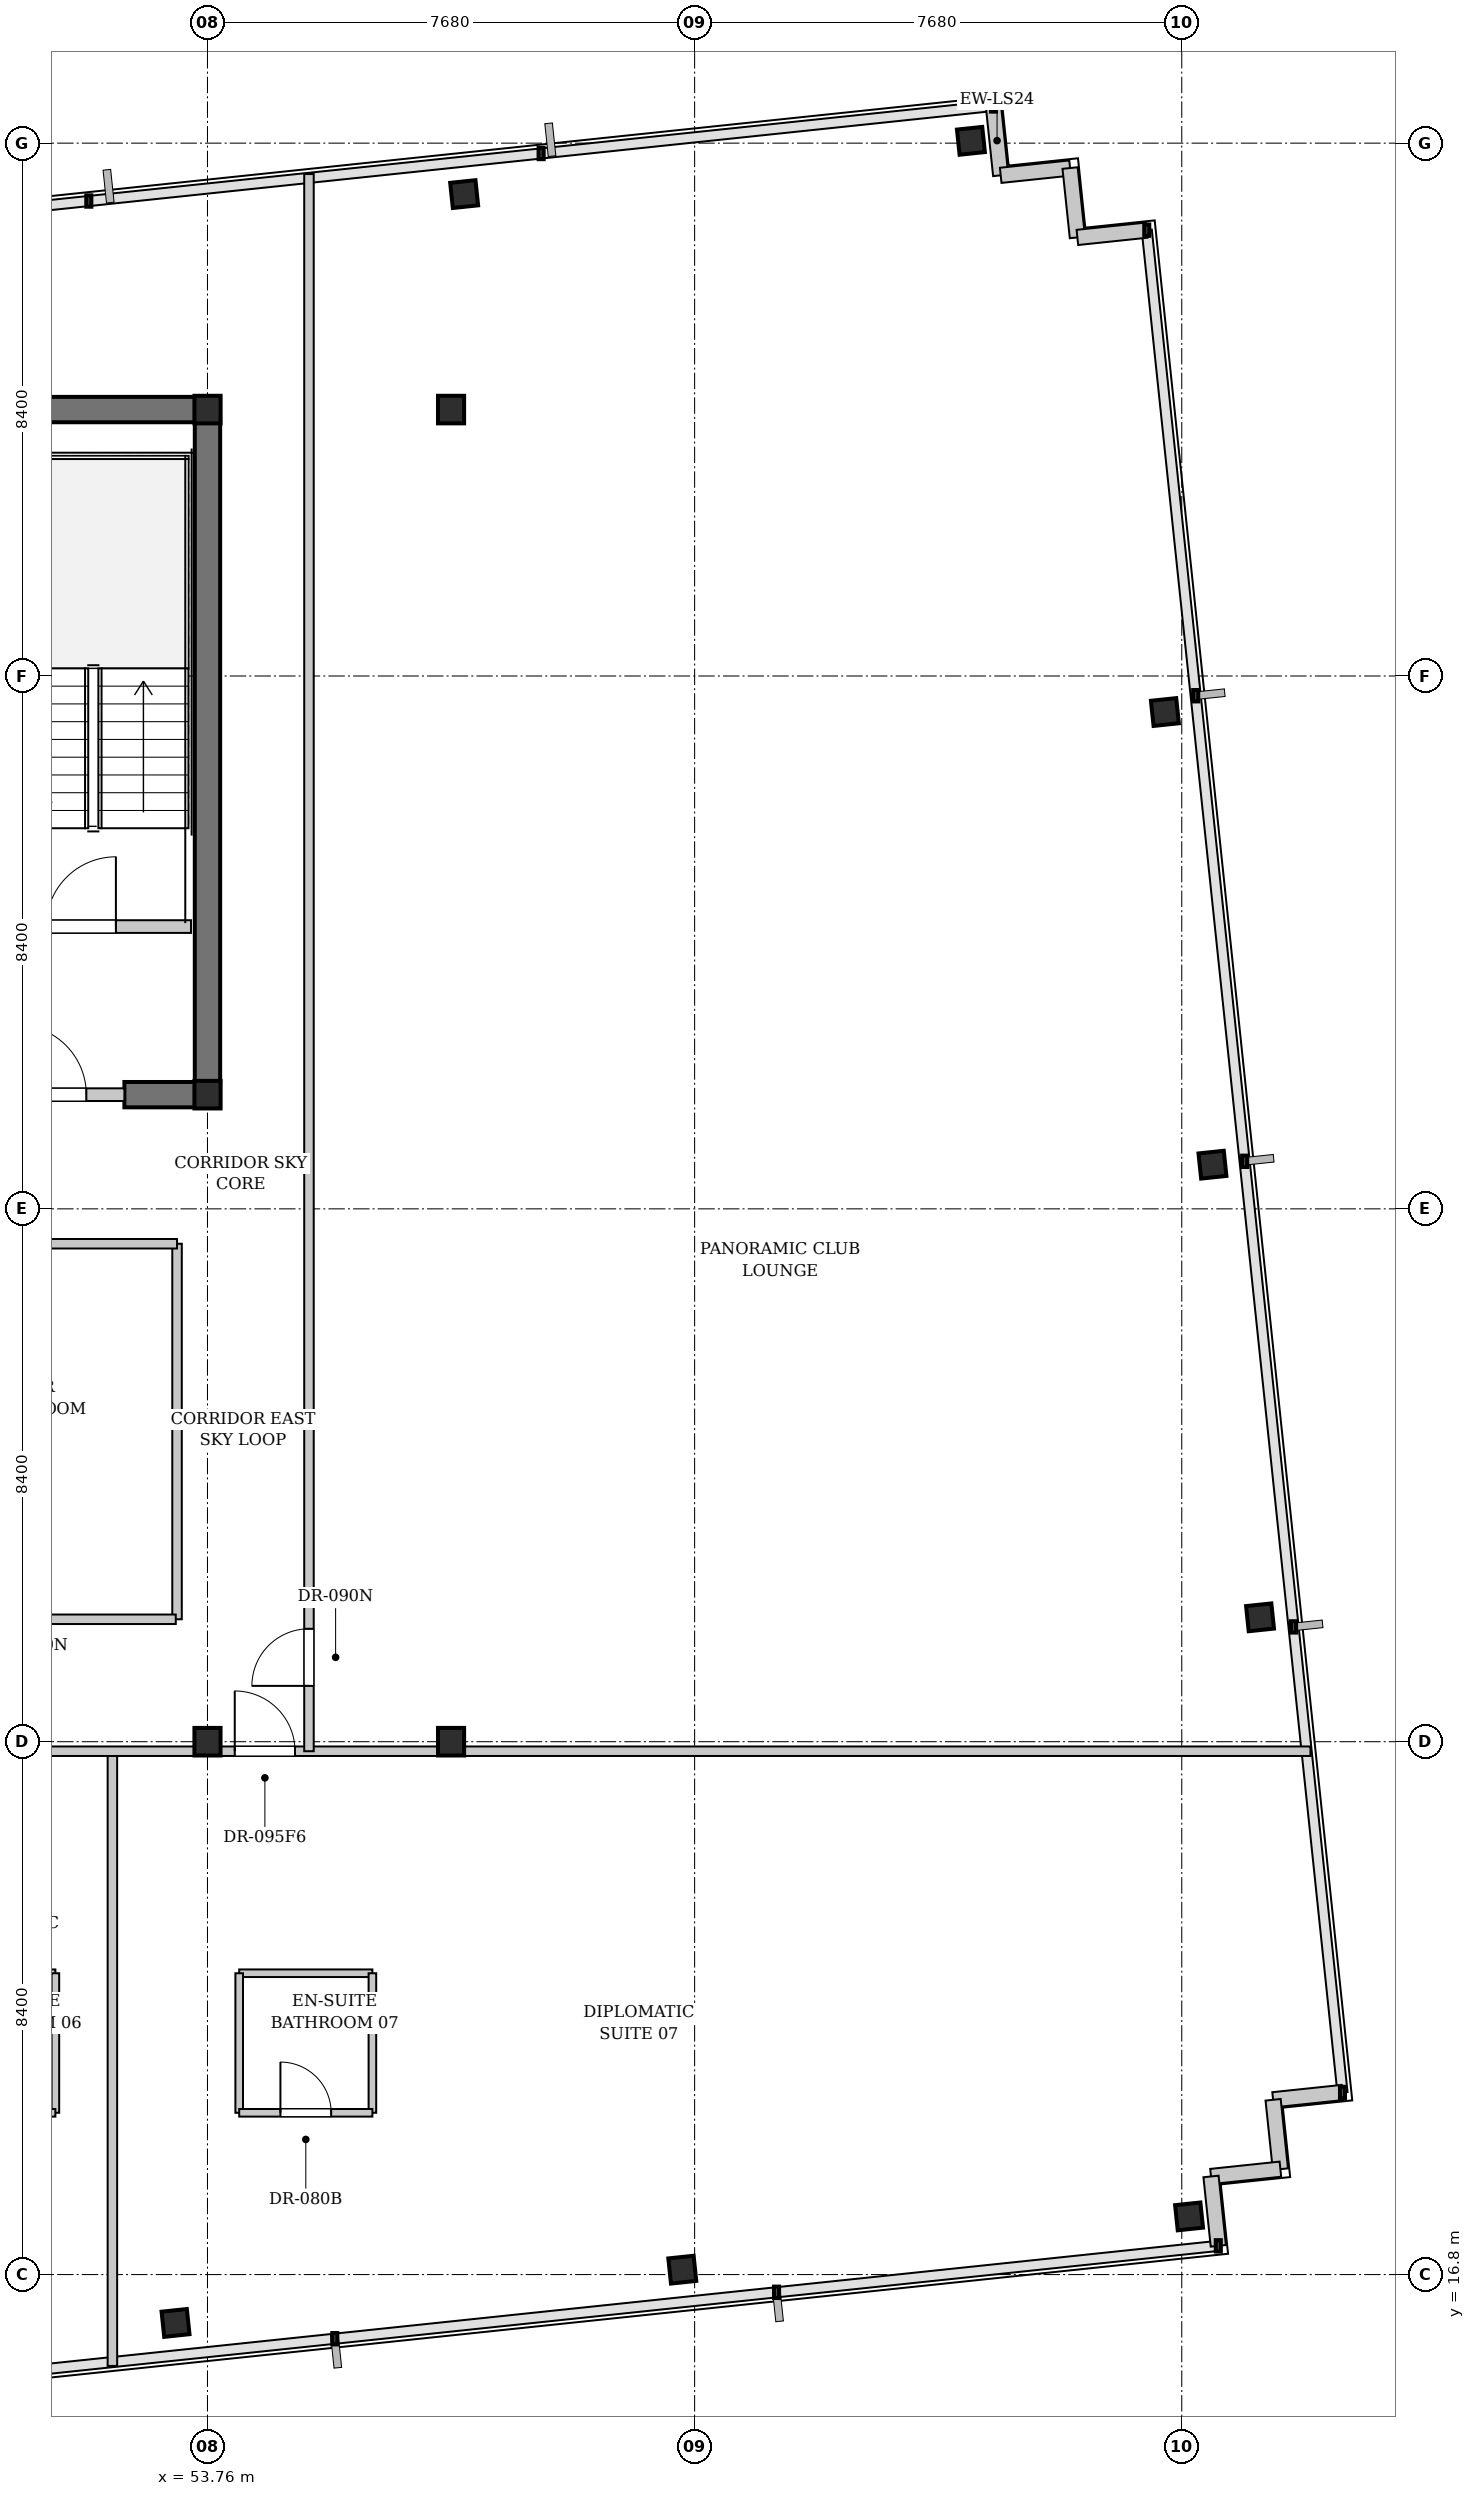
"""IFC4 building model, lengths in metres.
Left out: names, types, materials, properties, quantities, classifications, styles, units other than length and angle.
Written with IfcOpenShell. Run it as: python <this file> out.ifc"""

import sys

from ifc_helpers import new_model, si_unit, direction, frame, frame_2d, origin, origin_2d, place, context, subcontext, project, spatial, rectangle, i_section, extrude, element, fill, save


model = new_model("IFC4")
c1 = context("Model", 3, precision=1e-05, world=origin(), true_north=direction((0.0, 1.0)))
c2 = subcontext(c1, "Body", "Model", "MODEL_VIEW")
j1 = project(units=[si_unit("LENGTHUNIT", "METRE"), si_unit("PLANEANGLEUNIT", "RADIAN")], contexts=[c1])
p1 = place(None, origin())
s1 = spatial("IfcSite", under=j1, at=p1, CompositionType="ELEMENT")
p2 = place(p1, origin())
s2 = spatial("IfcBuilding", under=s1, at=p2, CompositionType="ELEMENT")
p3 = place(p2, frame((0.0, 0.0, 237.5)))
s3 = spatial("IfcBuildingStorey", under=s2, at=p3, CompositionType="ELEMENT", Elevation=237.5)
p4 = place(p3, frame((22.84, 46.2, 0.0), z_axis=(0.0, 0.0, 1.0), x_axis=(1.0, 0.0, 0.0)))
e1 = element("IfcWall", 1, at=p4, inside=s3, PredefinedType="SHEAR", context=c2, shape_type="SweptSolid", body=[
    extrude(rectangle(XDim=31.12, YDim=0.4, at=frame_2d((15.56, 0.0))), origin(), (0.0, 0.0, 1.0), 3.08),
])
p5 = place(p3, frame((52.45, 35.4, 0.0), z_axis=(0.0, 0.0, 1.0), x_axis=(1.0, 0.0, 0.0)))
e2 = element("IfcWall", 2, at=p5, inside=s3, PredefinedType="SHEAR", context=c2, shape_type="SweptSolid", body=[
    extrude(rectangle(XDim=1.51, YDim=0.4, at=frame_2d((0.755, 0.0))), origin(), (0.0, 0.0, 1.0), 3.08),
])
p6 = place(p3, frame((53.76, 35.6, 0.0), z_axis=(0.0, 0.0, 1.0), x_axis=(0.0, 1.0, 0.0)))
e3 = element("IfcWall", 3, at=p6, inside=s3, PredefinedType="SHEAR", context=c2, shape_type="SweptSolid", body=[
    extrude(rectangle(XDim=10.4, YDim=0.4, at=frame_2d((5.2, 0.0))), origin(), (0.0, 0.0, 1.0), 3.08),
])
for number, where, z_axis, x_axis in (
    (4, (53.76, 35.4, 0.0), (0.0, 0.0, 1.0), (1.0, 0.0, 0.0)),
    (5, (53.76, 46.2, 0.0), (0.0, 0.0, 1.0), (1.0, 0.0, 0.0)),
    (6, (53.76, 25.2, 0.0), (0.0, 0.0, 1.0), (1.0, 0.0, 0.0)),
    (7, (57.6, 25.2, 0.0), (0.0, 0.0, 1.0), (1.0, 0.0, 0.0)),
    (8, (57.6, 46.2, 0.0), (0.0, 0.0, 1.0), (1.0, 0.0, 0.0)),
):
    element("IfcColumn", number, at=place(p3, frame(where, z_axis=z_axis, x_axis=x_axis)), inside=s3, PredefinedType="COLUMN", context=c2, shape_type="SweptSolid", body=[
        extrude(i_section(OverallWidth=0.412, OverallDepth=0.435, WebThickness=0.036, FlangeThickness=0.058, FilletRadius=0.015, at=origin_2d()), origin(), (0.0, 0.0, 1.0), 3.3),
    ])
for number, where, z_axis, x_axis in (
    (9, (53.256, 16.037, 0.0), (0.0, 0.0, 1.0), (0.995, 0.105, 0.0)),
    (10, (61.246, 16.877, 0.0), (0.0, 0.0, 1.0), (0.995, 0.105, 0.0)),
    (11, (69.235, 17.717, 0.0), (0.0, 0.0, 1.0), (0.995, 0.105, 0.0)),
    (12, (57.807, 49.597, 0.0), (0.0, 0.0, 1.0), (0.995, 0.105, 0.0)),
    (13, (65.796, 50.437, 0.0), (0.0, 0.0, 1.0), (0.995, 0.105, 0.0)),
    (14, (70.354, 27.16, 0.0), (0.0, 0.0, 1.0), (0.995, 0.105, 0.0)),
    (15, (69.604, 34.296, 0.0), (0.0, 0.0, 1.0), (0.995, 0.105, 0.0)),
    (16, (68.854, 41.432, 0.0), (0.0, 0.0, 1.0), (0.995, 0.105, 0.0)),
):
    element("IfcColumn", number, at=place(p3, frame(where, z_axis=z_axis, x_axis=x_axis)), inside=s3, PredefinedType="COLUMN", context=c2, shape_type="SweptSolid", body=[
        extrude(i_section(OverallWidth=0.401, OverallDepth=0.399, WebThickness=0.025, FlangeThickness=0.04, FilletRadius=0.015, at=origin_2d()), origin(), (0.0, 0.0, 1.0), 3.3),
    ])
for number, where, z_axis, x_axis in (
    (17, (66.15, 50.987, 0.0), (0.0, 0.0, 1.0), (0.105, -0.995, 0.0)),
    (18, (66.265, 49.893, 0.0), (0.0, 0.0, 1.0), (0.995, 0.105, 0.0)),
    (19, (67.359, 50.008, 0.0), (0.0, 0.0, 1.0), (0.105, -0.995, 0.0)),
    (20, (67.474, 48.914, 0.0), (0.0, 0.0, 1.0), (0.995, 0.105, 0.0)),
    (21, (71.654, 19.67, 0.0), (0.0, 0.0, 1.0), (-0.995, -0.105, 0.0)),
    (22, (70.56, 19.555, 0.0), (0.0, 0.0, 1.0), (0.105, -0.995, 0.0)),
    (23, (70.675, 18.461, 0.0), (0.0, 0.0, 1.0), (-0.995, -0.105, 0.0)),
    (24, (69.581, 18.346, 0.0), (0.0, 0.0, 1.0), (0.105, -0.995, 0.0)),
):
    element("IfcWall", number, at=place(p3, frame(where, z_axis=z_axis, x_axis=x_axis)), inside=s3, PredefinedType="SOLIDWALL", context=c2, shape_type="SweptSolid", body=[
        extrude(rectangle(XDim=1.1, YDim=0.24, at=frame_2d((0.55, 0.0))), origin(), (0.0, 0.0, 1.0), 3.08),
    ])
p7 = place(p3, frame((49.78, 38.05, 0.0), z_axis=(0.0, 0.0, 1.0), x_axis=(1.0, 0.0, 0.0)))
e25 = element("IfcWall", 25, at=p7, inside=s3, PredefinedType="PARTITIONING", context=c2, shape_type="SweptSolid", body=[
    extrude(rectangle(XDim=3.72, YDim=0.2, at=frame_2d((1.86, 0.0))), origin(), (0.0, 0.0, 1.0), 3.08),
])
p8 = place(p7, frame((1.436, 0.0, 0.0)))
e26 = element("IfcOpeningElement", 26, at=p8, cuts=e25, PredefinedType="OPENING", context=c2, shape_type="SweptSolid", body=[
    extrude(rectangle(XDim=1.1, YDim=2.15, at=frame_2d((0.55, 1.075))), frame((0.0, 0.11, 0.0), z_axis=(0.0, -1.0, 0.0), x_axis=(1.0, 0.0, 0.0)), (0.0, 0.0, 1.0), 0.22),
])
p9 = place(p3, frame((50.15, 35.4, 0.0), z_axis=(0.0, 0.0, 1.0), x_axis=(1.0, 0.0, 0.0)))
e27 = element("IfcWall", 27, at=p9, inside=s3, PredefinedType="PARTITIONING", context=c2, shape_type="SweptSolid", body=[
    extrude(rectangle(XDim=2.3, YDim=0.2, at=frame_2d((1.15, 0.0))), origin(), (0.0, 0.0, 1.0), 2.313),
])
p10 = place(p9, frame((0.6, 0.0, 0.0)))
e28 = element("IfcOpeningElement", 28, at=p10, cuts=e27, PredefinedType="OPENING", context=c2, shape_type="SweptSolid", body=[
    extrude(rectangle(XDim=1.1, YDim=2.15, at=frame_2d((0.55, 1.075))), frame((0.0, 0.11, 0.0), z_axis=(0.0, -1.0, 0.0), x_axis=(1.0, 0.0, 0.0)), (0.0, 0.0, 1.0), 0.22),
])
p11 = place(p3, frame((49.262, 21.55, 0.0), z_axis=(0.0, 0.0, 1.0), x_axis=(1.0, 0.0, 0.0)))
e29 = element("IfcWall", 29, at=p11, inside=s3, PredefinedType="PARTITIONING", context=c2, shape_type="SweptSolid", body=[
    extrude(rectangle(XDim=2.1, YDim=0.12, at=frame_2d((1.05, 0.0))), origin(), (0.0, 0.0, 1.0), 3.08),
])
p12 = place(p3, frame((51.362, 19.35, 0.0), z_axis=(0.0, 0.0, 1.0), x_axis=(0.0, 1.0, 0.0)))
e30 = element("IfcWall", 30, at=p12, inside=s3, PredefinedType="PARTITIONING", context=c2, shape_type="SweptSolid", body=[
    extrude(rectangle(XDim=2.2, YDim=0.12, at=frame_2d((1.1, 0.0))), origin(), (0.0, 0.0, 1.0), 3.08),
])
p13 = place(p3, frame((49.262, 19.35, 0.0), z_axis=(0.0, 0.0, 1.0), x_axis=(1.0, 0.0, 0.0)))
e31 = element("IfcWall", 31, at=p13, inside=s3, PredefinedType="PARTITIONING", context=c2, shape_type="SweptSolid", body=[
    extrude(rectangle(XDim=2.1, YDim=0.12, at=frame_2d((1.05, 0.0))), origin(), (0.0, 0.0, 1.0), 3.08),
])
p14 = place(p13, frame((0.65, 0.0, 0.0)))
e32 = element("IfcOpeningElement", 32, at=p14, cuts=e31, PredefinedType="OPENING", context=c2, shape_type="SweptSolid", body=[
    extrude(rectangle(XDim=0.8, YDim=2.1, at=frame_2d((0.4, 1.05))), frame((0.0, 0.07, 0.0), z_axis=(0.0, -1.0, 0.0), x_axis=(1.0, 0.0, 0.0)), (0.0, 0.0, 1.0), 0.14),
])
p15 = place(p3, frame((54.26, 21.55, 0.0), z_axis=(0.0, 0.0, 1.0), x_axis=(1.0, 0.0, 0.0)))
e33 = element("IfcWall", 33, at=p15, inside=s3, PredefinedType="PARTITIONING", context=c2, shape_type="SweptSolid", body=[
    extrude(rectangle(XDim=2.1, YDim=0.12, at=frame_2d((1.05, 0.0))), origin(), (0.0, 0.0, 1.0), 3.08),
])
for number, where, z_axis, x_axis in (
    (34, (54.26, 19.35, 0.0), (0.0, 0.0, 1.0), (0.0, 1.0, 0.0)),
    (35, (56.36, 19.35, 0.0), (0.0, 0.0, 1.0), (0.0, 1.0, 0.0)),
):
    element("IfcWall", number, at=place(p3, frame(where, z_axis=z_axis, x_axis=x_axis)), inside=s3, PredefinedType="PARTITIONING", context=c2, shape_type="SweptSolid", body=[
        extrude(rectangle(XDim=2.2, YDim=0.12, at=frame_2d((1.1, 0.0))), origin(), (0.0, 0.0, 1.0), 3.08),
    ])
p16 = place(p3, frame((54.26, 19.35, 0.0), z_axis=(0.0, 0.0, 1.0), x_axis=(1.0, 0.0, 0.0)))
e36 = element("IfcWall", 36, at=p16, inside=s3, PredefinedType="PARTITIONING", context=c2, shape_type="SweptSolid", body=[
    extrude(rectangle(XDim=2.1, YDim=0.12, at=frame_2d((1.05, 0.0))), origin(), (0.0, 0.0, 1.0), 3.08),
])
p17 = place(p16, frame((0.65, 0.0, 0.0)))
e37 = element("IfcOpeningElement", 37, at=p17, cuts=e36, PredefinedType="OPENING", context=c2, shape_type="SweptSolid", body=[
    extrude(rectangle(XDim=0.8, YDim=2.1, at=frame_2d((0.4, 1.05))), frame((0.0, 0.07, 0.0), z_axis=(0.0, -1.0, 0.0), x_axis=(1.0, 0.0, 0.0)), (0.0, 0.0, 1.0), 0.14),
])
p18 = place(p3, frame((52.261, 15.36, 0.0), z_axis=(0.0, 0.0, 1.0), x_axis=(0.0, 1.0, 0.0)))
e38 = element("IfcWall", 38, at=p18, inside=s3, PredefinedType="PARTITIONING", context=c2, shape_type="SweptSolid", body=[
    extrude(rectangle(XDim=9.71, YDim=0.15, at=frame_2d((4.855, 0.0))), origin(), (0.0, 0.0, 1.0), 3.08),
])
p19 = place(p3, frame((35.62, 25.05, 0.0), z_axis=(0.0, 0.0, 1.0), x_axis=(1.0, 0.0, 0.0)))
e39 = element("IfcWall", 39, at=p19, inside=s3, PredefinedType="PARTITIONING", context=c2, shape_type="SweptSolid", body=[
    extrude(rectangle(XDim=35.529, YDim=0.15, at=frame_2d((17.764, 0.0))), origin(), (0.0, 0.0, 1.0), 2.313),
])
p20 = place(p19, frame((4.399, 0.0, 0.0)))
e40 = element("IfcOpeningElement", 40, at=p20, cuts=e39, PredefinedType="OPENING", context=c2, shape_type="SweptSolid", body=[
    extrude(rectangle(XDim=0.95, YDim=2.15, at=frame_2d((0.475, 1.075))), frame((0.0, 0.085, 0.0), z_axis=(0.0, -1.0, 0.0), x_axis=(1.0, 0.0, 0.0)), (0.0, 0.0, 1.0), 0.17),
])
p21 = place(p19, frame((7.937, 0.0, 0.0)))
e41 = element("IfcOpeningElement", 41, at=p21, cuts=e39, PredefinedType="OPENING", context=c2, shape_type="SweptSolid", body=[
    extrude(rectangle(XDim=0.95, YDim=2.15, at=frame_2d((0.475, 1.075))), frame((0.0, 0.085, 0.0), z_axis=(0.0, -1.0, 0.0), x_axis=(1.0, 0.0, 0.0)), (0.0, 0.0, 1.0), 0.17),
])
p22 = place(p19, frame((14.332, 0.0, 0.0)))
e42 = element("IfcOpeningElement", 42, at=p22, cuts=e39, PredefinedType="OPENING", context=c2, shape_type="SweptSolid", body=[
    extrude(rectangle(XDim=0.95, YDim=2.15, at=frame_2d((0.475, 1.075))), frame((0.0, 0.085, 0.0), z_axis=(0.0, -1.0, 0.0), x_axis=(1.0, 0.0, 0.0)), (0.0, 0.0, 1.0), 0.17),
])
p23 = place(p19, frame((18.57, 0.0, 0.0)))
e43 = element("IfcOpeningElement", 43, at=p23, cuts=e39, PredefinedType="OPENING", context=c2, shape_type="SweptSolid", body=[
    extrude(rectangle(XDim=0.95, YDim=2.15, at=frame_2d((0.475, 1.075))), frame((0.0, 0.085, 0.0), z_axis=(0.0, -1.0, 0.0), x_axis=(1.0, 0.0, 0.0)), (0.0, 0.0, 1.0), 0.17),
])
p24 = place(p3, frame((55.36, 25.05, 0.0), z_axis=(0.0, 0.0, 1.0), x_axis=(0.0, 1.0, 0.0)))
e44 = element("IfcWall", 44, at=p24, inside=s3, PredefinedType="PARTITIONING", context=c2, shape_type="SweptSolid", body=[
    extrude(rectangle(XDim=24.863, YDim=0.15, at=frame_2d((12.431, 0.0))), origin(), (0.0, 0.0, 1.0), 3.08),
])
p25 = place(p24, frame((1.03, 0.0, 0.0)))
e45 = element("IfcOpeningElement", 45, at=p25, cuts=e44, PredefinedType="OPENING", context=c2, shape_type="SweptSolid", body=[
    extrude(rectangle(XDim=0.9, YDim=2.15, at=frame_2d((0.45, 1.075))), frame((0.0, 0.085, 0.0), z_axis=(0.0, -1.0, 0.0), x_axis=(1.0, 0.0, 0.0)), (0.0, 0.0, 1.0), 0.17),
])
p26 = place(p3, frame((53.28, 27.13, 0.0), z_axis=(0.0, 0.0, 1.0), x_axis=(0.0, 1.0, 0.0)))
e46 = element("IfcWall", 46, at=p26, inside=s3, PredefinedType="PARTITIONING", context=c2, shape_type="SweptSolid", body=[
    extrude(rectangle(XDim=5.92, YDim=0.15, at=frame_2d((2.96, 0.0))), origin(), (0.0, 0.0, 1.0), 3.08),
])
p27 = place(p3, frame((35.62, 33.05, 0.0), z_axis=(0.0, 0.0, 1.0), x_axis=(1.0, 0.0, 0.0)))
e47 = element("IfcWall", 47, at=p27, inside=s3, PredefinedType="PARTITIONING", context=c2, shape_type="SweptSolid", body=[
    extrude(rectangle(XDim=17.66, YDim=0.15, at=frame_2d((8.83, 0.0))), origin(), (0.0, 0.0, 1.0), 3.08),
])
p28 = place(p3, frame((35.63, 27.13, 0.0), z_axis=(0.0, 0.0, 1.0), x_axis=(1.0, 0.0, 0.0)))
e48 = element("IfcWall", 48, at=p28, inside=s3, PredefinedType="PARTITIONING", context=c2, shape_type="SweptSolid", body=[
    extrude(rectangle(XDim=17.63, YDim=0.15, at=frame_2d((8.815, 0.0))), origin(), (0.0, 0.0, 1.0), 3.08),
])
p29 = place(p28, frame((1.577, 0.0, 0.0)))
e49 = element("IfcOpeningElement", 49, at=p29, cuts=e48, PredefinedType="OPENING", context=c2, shape_type="SweptSolid", body=[
    extrude(rectangle(XDim=0.9, YDim=2.15, at=frame_2d((0.45, 1.075))), frame((0.0, 0.085, 0.0), z_axis=(0.0, -1.0, 0.0), x_axis=(1.0, 0.0, 0.0)), (0.0, 0.0, 1.0), 0.17),
])
p30 = place(p28, frame((6.779, 0.0, 0.0)))
e50 = element("IfcOpeningElement", 50, at=p30, cuts=e48, PredefinedType="OPENING", context=c2, shape_type="SweptSolid", body=[
    extrude(rectangle(XDim=0.9, YDim=2.15, at=frame_2d((0.45, 1.075))), frame((0.0, 0.085, 0.0), z_axis=(0.0, -1.0, 0.0), x_axis=(1.0, 0.0, 0.0)), (0.0, 0.0, 1.0), 0.17),
])
p31 = place(p28, frame((13.566, 0.0, 0.0)))
e51 = element("IfcOpeningElement", 51, at=p31, cuts=e48, PredefinedType="OPENING", context=c2, shape_type="SweptSolid", body=[
    extrude(rectangle(XDim=0.9, YDim=2.15, at=frame_2d((0.45, 1.075))), frame((0.0, 0.085, 0.0), z_axis=(0.0, -1.0, 0.0), x_axis=(1.0, 0.0, 0.0)), (0.0, 0.0, 1.0), 0.17),
])
p32 = place(p8, origin())
e52 = element("IfcDoor", 52, at=p32, inside=s3, OperationType="SINGLE_SWING_RIGHT", PredefinedType="DOOR", context=c2, shape_type="SweptSolid", body=[
    extrude(rectangle(XDim=1.1, YDim=2.15, at=frame_2d((0.55, 1.075))), frame((0.0, 0.025, 0.0), z_axis=(0.0, -1.0, 0.0), x_axis=(1.0, 0.0, 0.0)), (0.0, 0.0, 1.0), 0.05),
])
fill(e26, e52)
p33 = place(p10, origin())
e53 = element("IfcDoor", 53, at=p33, inside=s3, OperationType="SINGLE_SWING_LEFT", PredefinedType="DOOR", context=c2, shape_type="SweptSolid", body=[
    extrude(rectangle(XDim=1.1, YDim=2.15, at=frame_2d((0.55, 1.075))), frame((0.0, 0.025, 0.0), z_axis=(0.0, -1.0, 0.0), x_axis=(1.0, 0.0, 0.0)), (0.0, 0.0, 1.0), 0.05),
])
fill(e28, e53)
p34 = place(p17, origin())
e54 = element("IfcDoor", 54, at=p34, inside=s3, OperationType="SINGLE_SWING_LEFT", PredefinedType="DOOR", context=c2, shape_type="SweptSolid", body=[
    extrude(rectangle(XDim=0.8, YDim=2.1, at=frame_2d((0.4, 1.05))), frame((0.0, 0.025, 0.0), z_axis=(0.0, -1.0, 0.0), x_axis=(1.0, 0.0, 0.0)), (0.0, 0.0, 1.0), 0.05),
])
fill(e37, e54)
p35 = place(p23, origin())
e55 = element("IfcDoor", 55, at=p35, inside=s3, OperationType="SINGLE_SWING_LEFT", PredefinedType="DOOR", context=c2, shape_type="SweptSolid", body=[
    extrude(rectangle(XDim=0.95, YDim=2.15, at=frame_2d((0.475, 1.075))), frame((0.0, 0.025, 0.0), z_axis=(0.0, -1.0, 0.0), x_axis=(1.0, 0.0, 0.0)), (0.0, 0.0, 1.0), 0.05),
])
fill(e43, e55)
p36 = place(p25, origin())
e56 = element("IfcDoor", 56, at=p36, inside=s3, OperationType="SINGLE_SWING_LEFT", PredefinedType="DOOR", context=c2, shape_type="SweptSolid", body=[
    extrude(rectangle(XDim=0.9, YDim=2.15, at=frame_2d((0.45, 1.075))), frame((0.0, 0.025, 0.0), z_axis=(0.0, -1.0, 0.0), x_axis=(1.0, 0.0, 0.0)), (0.0, 0.0, 1.0), 0.05),
])
fill(e45, e56)
save(model, sys.argv[1])
